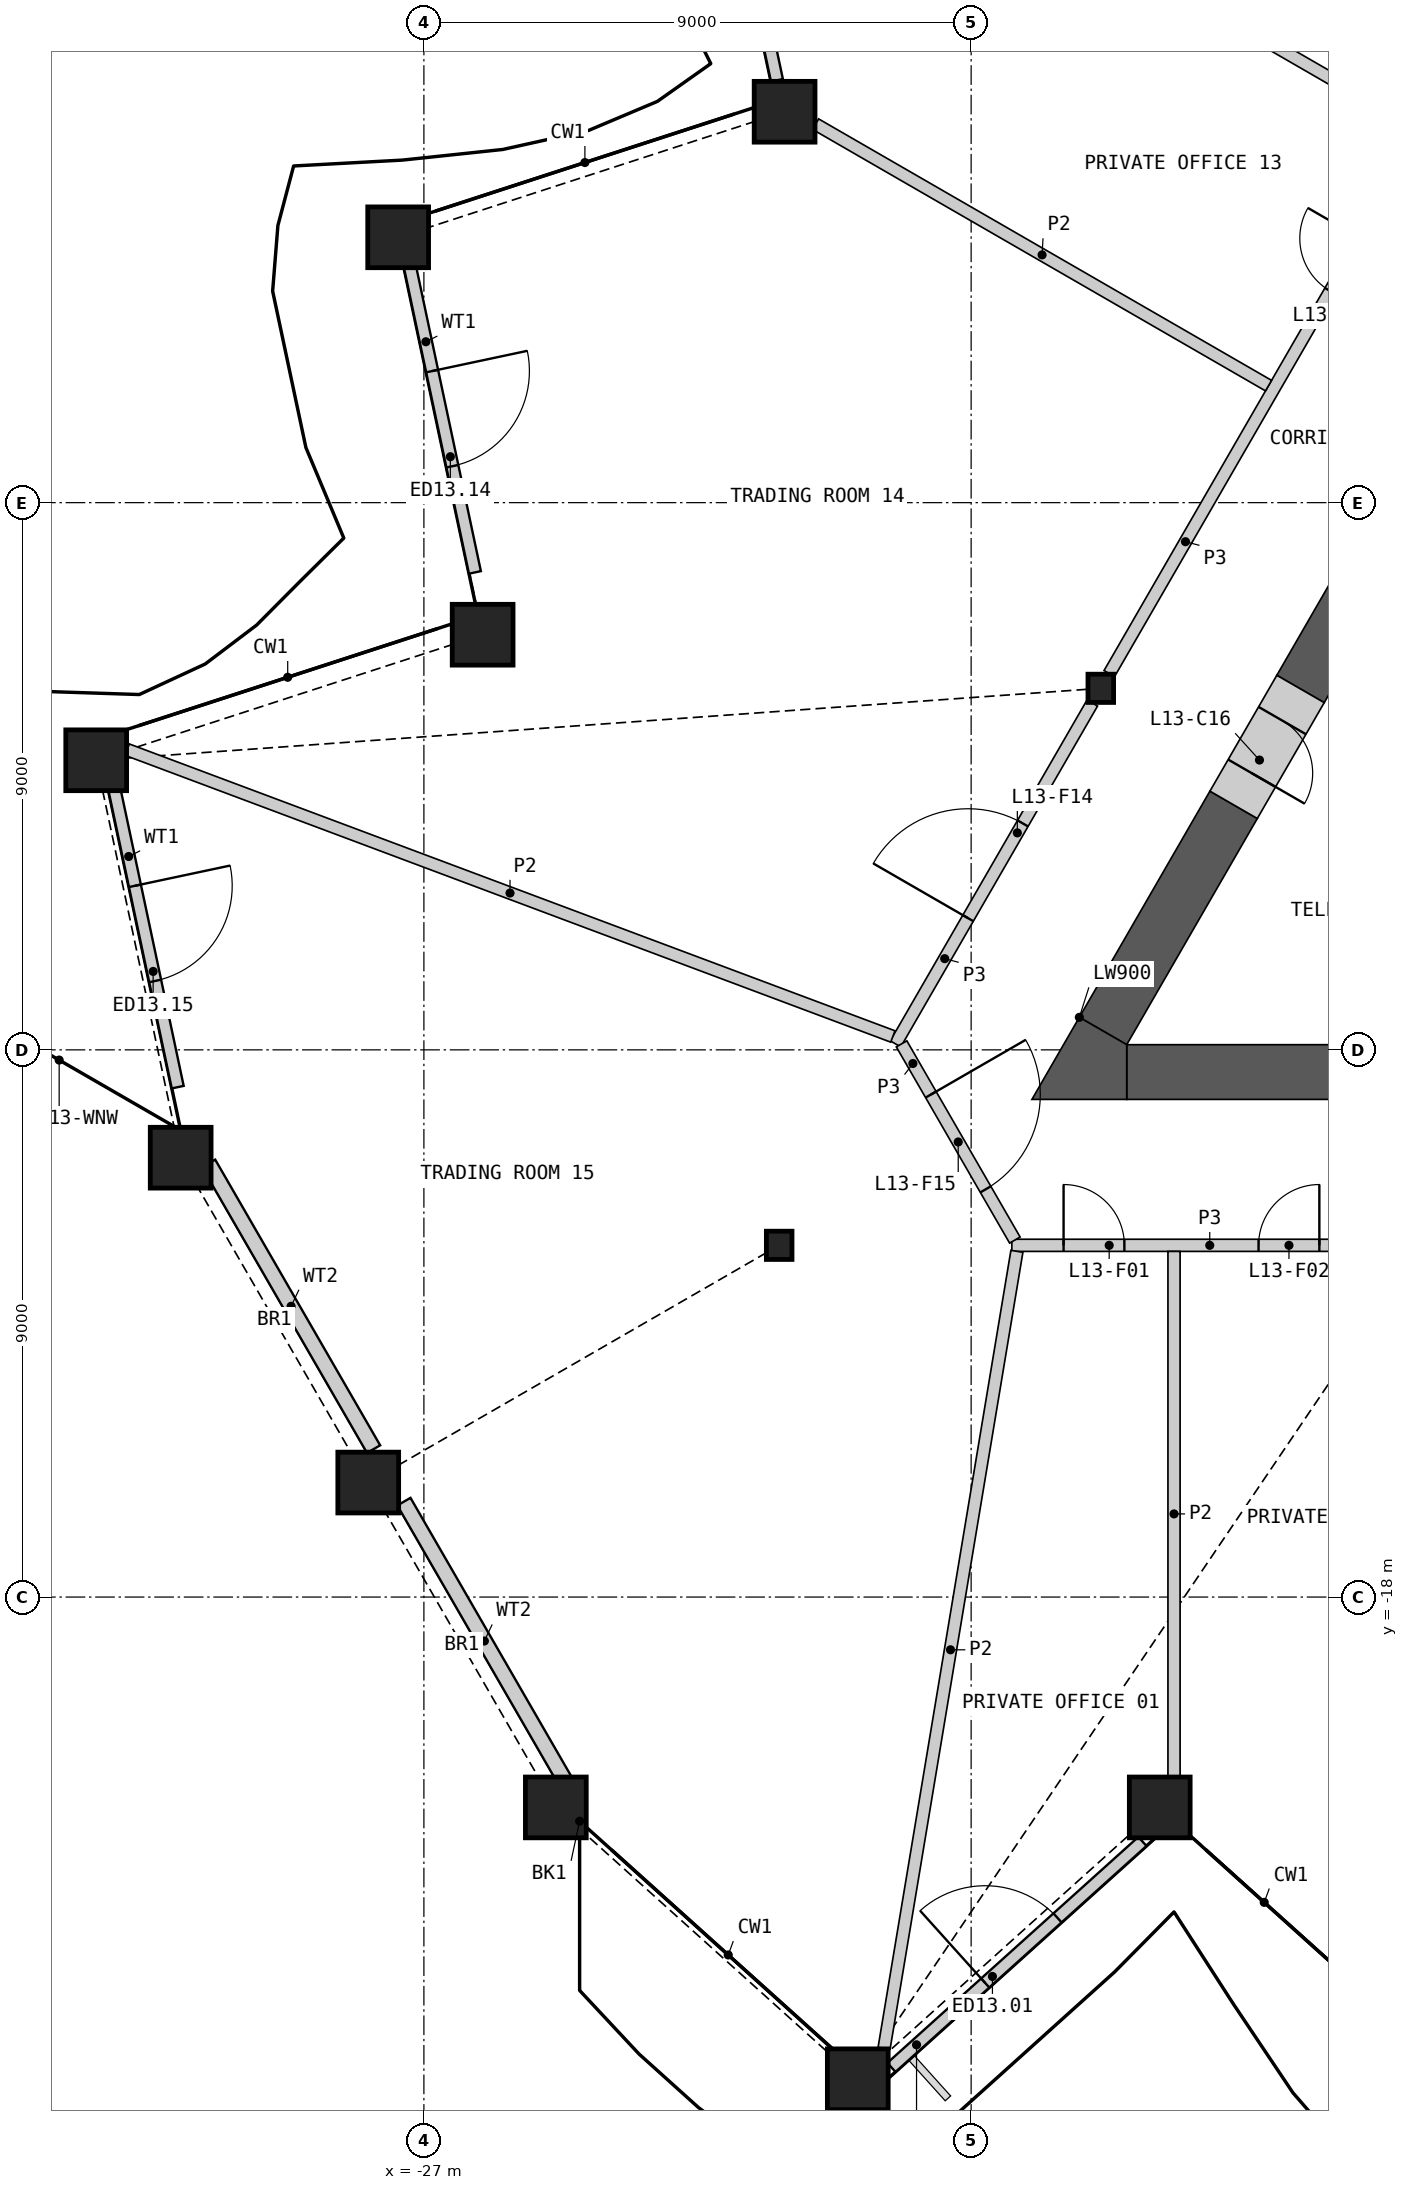
"""IFC4 building model, lengths in metres.
Left out: names, types, materials, properties, quantities, classifications, styles, units other than length and angle.
Written with IfcOpenShell. Run it as: python <this file> out.ifc"""

import sys

from ifc_helpers import new_model, si_unit, direction, frame, frame_2d, origin, origin_2d, place, context, subcontext, project, spatial, polyline, rectangle, hollow_rectangle, i_section, outline, extrude, element, fill, save


model = new_model("IFC4")
c1 = context("Model", 3, precision=1e-05, world=origin(), true_north=direction((0.0, 1.0)))
c2 = subcontext(c1, "Body", "Model", "MODEL_VIEW")
j1 = project(units=[si_unit("LENGTHUNIT", "METRE"), si_unit("PLANEANGLEUNIT", "RADIAN")], contexts=[c1])
p1 = place(None, origin())
s1 = spatial("IfcSite", under=j1, at=p1, CompositionType="ELEMENT")
p2 = place(p1, origin())
s2 = spatial("IfcBuilding", under=s1, at=p2, CompositionType="ELEMENT")
p3 = place(p2, frame((0.0, 0.0, 63.6)))
s3 = spatial("IfcBuildingStorey", under=s2, at=p3, CompositionType="ELEMENT", Elevation=63.6)
for number, where, z_axis, x_axis in (
    (1, (-24.83, -21.46, 0.0), (0.0, 0.0, 1.0), (1.0, 0.0, 0.0)),
    (2, (-19.864, -25.931, 0.0), (0.0, 0.0, 1.0), (1.0, 0.0, 0.0)),
    (3, (-14.898, -21.46, 0.0), (0.0, 0.0, 1.0), (1.0, 0.0, 0.0)),
    (4, (-21.068, 6.429, 0.0), (0.0, 0.0, 1.0), (1.0, 0.0, 0.0)),
    (5, (-27.423, 4.364, 0.0), (0.0, 0.0, 1.0), (1.0, 0.0, 0.0)),
    (6, (-26.034, -2.172, 0.0), (0.0, 0.0, 1.0), (1.0, 0.0, 0.0)),
    (7, (-32.389, -4.237, 0.0), (0.0, 0.0, 1.0), (1.0, 0.0, 0.0)),
    (8, (-31.0, -10.774, 0.0), (0.0, 0.0, 1.0), (1.0, 0.0, 0.0)),
    (9, (-27.915, -16.117, 0.0), (0.0, 0.0, 1.0), (1.0, 0.0, 0.0)),
):
    element("IfcColumn", number, at=place(p3, frame(where, z_axis=z_axis, x_axis=x_axis)), inside=s3, PredefinedType="COLUMN", context=c2, shape_type="SweptSolid", body=[
        extrude(hollow_rectangle(XDim=1.0, YDim=1.0, WallThickness=0.07, at=origin_2d()), origin(), (0.0, 0.0, 1.0), 4.2),
    ])
for number, where, z_axis, x_axis in (
    (10, (-15.868, -3.054, 0.0), (0.0, 0.0, 1.0), (1.0, 0.0, 0.0)),
    (11, (-21.157, -12.215, 0.0), (0.0, 0.0, 1.0), (1.0, 0.0, 0.0)),
):
    element("IfcColumn", number, at=place(p3, frame(where, z_axis=z_axis, x_axis=x_axis)), inside=s3, PredefinedType="COLUMN", context=c2, shape_type="SweptSolid", body=[
        extrude(i_section(OverallWidth=0.421, OverallDepth=0.465, WebThickness=0.045, FlangeThickness=0.072, at=origin_2d()), origin(), (0.0, 0.0, 1.0), 4.2),
    ])
p4 = place(p3, frame((-19.311, -25.736, 0.0), z_axis=(0.0, 0.0, 1.0), x_axis=(0.743147692621, 0.66912742206, 0.0)))
e12 = element("IfcWall", 12, at=p4, inside=s3, PredefinedType="SOLIDWALL", context=c2, shape_type="SweptSolid", body=[
    extrude(rectangle(XDim=5.554, YDim=0.2, at=frame_2d((2.777, 0.0))), origin(), (0.0, 0.0, 1.0), 3.189),
])
p5 = place(p4, frame((2.075, 0.0, 0.0)))
e13 = element("IfcOpeningElement", 13, at=p5, cuts=e12, PredefinedType="OPENING", context=c2, shape_type="SweptSolid", body=[
    extrude(rectangle(XDim=1.6, YDim=2.4, at=frame_2d((0.8, 1.2))), frame((0.0, 0.11, 0.0), z_axis=(0.0, -1.0, 0.0), x_axis=(1.0, 0.0, 0.0)), (0.0, 0.0, 1.0), 0.22),
])
p6 = place(p3, frame((-22.363, 12.449, 0.0), z_axis=(0.0, 0.0, 1.0), x_axis=(0.207901831982, -0.978149696242, 0.0)))
e14 = element("IfcWall", 14, at=p6, inside=s3, PredefinedType="SOLIDWALL", context=c2, shape_type="SweptSolid", body=[
    extrude(rectangle(XDim=5.626, YDim=0.2, at=frame_2d((2.813, 0.0))), origin(), (0.0, 0.0, 1.0), 3.189),
])
p7 = place(p6, frame((1.86, 0.0, 0.0)))
e15 = element("IfcOpeningElement", 15, at=p7, cuts=e14, PredefinedType="OPENING", context=c2, shape_type="SweptSolid", body=[
    extrude(rectangle(XDim=1.6, YDim=2.4, at=frame_2d((0.8, 1.2))), frame((0.0, 0.11, 0.0), z_axis=(0.0, -1.0, 0.0), x_axis=(1.0, 0.0, 0.0)), (0.0, 0.0, 1.0), 0.22),
])
p8 = place(p3, frame((-27.236, 3.911, 0.0), z_axis=(0.0, 0.0, 1.0), x_axis=(0.207877954287, -0.978154771047, 0.0)))
e16 = element("IfcWall", 16, at=p8, inside=s3, PredefinedType="SOLIDWALL", context=c2, shape_type="SweptSolid", body=[
    extrude(rectangle(XDim=5.171, YDim=0.2, at=frame_2d((2.585, 0.0))), origin(), (0.0, 0.0, 1.0), 3.189),
])
p9 = place(p8, frame((1.786, 0.0, 0.0)))
e17 = element("IfcOpeningElement", 17, at=p9, cuts=e16, PredefinedType="OPENING", context=c2, shape_type="SweptSolid", body=[
    extrude(rectangle(XDim=1.6, YDim=2.4, at=frame_2d((0.8, 1.2))), frame((0.0, 0.11, 0.0), z_axis=(0.0, -1.0, 0.0), x_axis=(1.0, 0.0, 0.0)), (0.0, 0.0, 1.0), 0.22),
])
p10 = place(p3, frame((-32.124, -4.555, 0.0), z_axis=(0.0, 0.0, 1.0), x_axis=(0.207923126203, -0.978145169998, 0.0)))
e18 = element("IfcWall", 18, at=p10, inside=s3, PredefinedType="SOLIDWALL", context=c2, shape_type="SweptSolid", body=[
    extrude(rectangle(XDim=5.171, YDim=0.2, at=frame_2d((2.585, 0.0))), origin(), (0.0, 0.0, 1.0), 3.189),
])
p11 = place(p10, frame((1.786, 0.0, 0.0)))
e19 = element("IfcOpeningElement", 19, at=p11, cuts=e18, PredefinedType="OPENING", context=c2, shape_type="SweptSolid", body=[
    extrude(rectangle(XDim=1.6, YDim=2.4, at=frame_2d((0.8, 1.2))), frame((0.0, 0.11, 0.0), z_axis=(0.0, -1.0, 0.0), x_axis=(1.0, 0.0, 0.0)), (0.0, 0.0, 1.0), 0.22),
])
p12 = place(p3, frame((-30.54, -10.868, 0.0), z_axis=(0.0, 0.0, 1.0), x_axis=(0.499991204533, -0.86603048179, 0.0)))
e20 = element("IfcWall", 20, at=p12, inside=s3, PredefinedType="SOLIDWALL", context=c2, shape_type="SweptSolid", body=[
    extrude(rectangle(XDim=5.426, YDim=0.25, at=frame_2d((2.713, 0.0))), origin(), (0.0, 0.0, 1.0), 3.189),
])
p13 = place(p3, frame((-27.329, -16.431, 0.0), z_axis=(0.0, 0.0, 1.0), x_axis=(0.500008603535, -0.866020436474, 0.0)))
e21 = element("IfcWall", 21, at=p13, inside=s3, PredefinedType="SOLIDWALL", context=c2, shape_type="SweptSolid", body=[
    extrude(rectangle(XDim=5.293, YDim=0.25, at=frame_2d((2.646, 0.0))), origin(), (0.0, 0.0, 1.0), 3.189),
])
p14 = place(p3, frame((-15.441, -9.365, 0.0), z_axis=(0.0, 0.0, 1.0), x_axis=(1.0, 0.0, 0.0)))
e22 = element("IfcWall", 22, at=p14, inside=s3, PredefinedType="SHEAR", context=c2, shape_type="SweptSolid", body=[
    extrude(rectangle(XDim=14.341, YDim=0.9, at=frame_2d((7.17, 0.0))), origin(), (0.0, 0.0, 1.0), 3.8),
])
p15 = place(p3, frame((-10.31, 0.872, 0.0), z_axis=(0.0, 0.0, 1.0), x_axis=(-0.499968858743, -0.866043382451, 0.0)))
e23 = element("IfcWall", 23, at=p15, inside=s3, PredefinedType="SHEAR", context=c2, shape_type="SweptSolid", body=[
    extrude(rectangle(XDim=4.546, YDim=0.9, at=frame_2d((2.273, 0.0))), origin(), (0.0, 0.0, 1.0), 3.8),
])
p16 = place(p3, frame((-13.683, -4.97, 0.0), z_axis=(0.0, 0.0, 1.0), x_axis=(-0.499996331799, -0.866027521611, 0.0)))
e24 = element("IfcWall", 24, at=p16, inside=s3, PredefinedType="SHEAR", context=c2, shape_type="SweptSolid", body=[
    extrude(rectangle(XDim=4.295, YDim=0.9, at=frame_2d((2.148, 0.0))), origin(), (0.0, 0.0, 1.0), 3.8),
])
p17 = place(p3, origin())
e25 = element("IfcWall", 25, at=p17, inside=s3, PredefinedType="SHEAR", context=c2, shape_type="SweptSolid", body=[
    extrude(outline(polyline([(-16.221, -8.465), (-15.441, -8.915), (-15.441, -9.815), (-17.0, -9.815), (-16.221, -8.465)])), origin(), (0.0, 0.0, 1.0), 3.8),
])
p18 = place(p3, frame((-12.583, -3.065, 0.0), z_axis=(0.0, 0.0, 1.0), x_axis=(-0.50002983664, -0.866008176907, 0.0)))
e26 = element("IfcWall", 26, at=p18, inside=s3, PredefinedType="SHEAR", context=c2, shape_type="SweptSolid", body=[
    extrude(rectangle(XDim=2.2, YDim=0.9, at=frame_2d((1.1, 0.0))), origin(), (0.0, 0.0, 1.0), 3.8),
])
p19 = place(p18, frame((0.6, 0.0, 0.0)))
e27 = element("IfcOpeningElement", 27, at=p19, cuts=e26, PredefinedType="OPENING", context=c2, shape_type="SweptSolid", body=[
    extrude(rectangle(XDim=1.0, YDim=2.1, at=frame_2d((0.5, 1.05))), frame((0.0, 0.46, 0.0), z_axis=(0.0, -1.0, 0.0), x_axis=(1.0, 0.0, 0.0)), (0.0, 0.0, 1.0), 0.92),
])
p20 = place(p3, frame((-15.728, -2.811, 0.0), z_axis=(0.0, 0.0, 1.0), x_axis=(0.49999175339, 0.866030164915, 0.0)))
e28 = element("IfcWall", 28, at=p20, inside=s3, PredefinedType="PARTITIONING", context=c2, shape_type="SweptSolid", body=[
    extrude(rectangle(XDim=10.019, YDim=0.2, at=frame_2d((5.009, 0.0))), origin(), (0.0, 0.0, 1.0), 3.8),
])
p21 = place(p20, frame((7.266, 0.0, 0.0)))
e29 = element("IfcOpeningElement", 29, at=p21, cuts=e28, PredefinedType="OPENING", context=c2, shape_type="SweptSolid", body=[
    extrude(rectangle(XDim=1.0, YDim=2.1, at=frame_2d((0.5, 1.05))), frame((0.0, 0.11, 0.0), z_axis=(0.0, -1.0, 0.0), x_axis=(1.0, 0.0, 0.0)), (0.0, 0.0, 1.0), 0.22),
])
p22 = place(p3, frame((-17.331, -12.215, 0.0), z_axis=(0.0, 0.0, 1.0), x_axis=(1.0, 0.0, 0.0)))
e30 = element("IfcWall", 30, at=p22, inside=s3, PredefinedType="PARTITIONING", context=c2, shape_type="SweptSolid", body=[
    extrude(rectangle(XDim=6.51, YDim=0.2, at=frame_2d((3.255, 0.0))), origin(), (0.0, 0.0, 1.0), 3.8),
])
p23 = place(p22, frame((0.851, 0.0, 0.0)))
e31 = element("IfcOpeningElement", 31, at=p23, cuts=e30, PredefinedType="OPENING", context=c2, shape_type="SweptSolid", body=[
    extrude(rectangle(XDim=1.0, YDim=2.1, at=frame_2d((0.5, 1.05))), frame((0.0, 0.11, 0.0), z_axis=(0.0, -1.0, 0.0), x_axis=(1.0, 0.0, 0.0)), (0.0, 0.0, 1.0), 0.22),
])
p24 = place(p22, frame((4.058, 0.0, 0.0)))
e32 = element("IfcOpeningElement", 32, at=p24, cuts=e30, PredefinedType="OPENING", context=c2, shape_type="SweptSolid", body=[
    extrude(rectangle(XDim=1.0, YDim=2.1, at=frame_2d((0.5, 1.05))), frame((0.0, 0.11, 0.0), z_axis=(0.0, -1.0, 0.0), x_axis=(1.0, 0.0, 0.0)), (0.0, 0.0, 1.0), 0.22),
])
p25 = place(p3, frame((-19.244, -8.902, 0.0), z_axis=(0.0, 0.0, 1.0), x_axis=(0.499984737558, 0.86603421538, 0.0)))
e33 = element("IfcWall", 33, at=p25, inside=s3, PredefinedType="PARTITIONING", context=c2, shape_type="SweptSolid", body=[
    extrude(rectangle(XDim=6.473, YDim=0.2, at=frame_2d((3.236, 0.0))), origin(), (0.0, 0.0, 1.0), 3.8),
])
p26 = place(p25, frame((2.387, 0.0, 0.0)))
e34 = element("IfcOpeningElement", 34, at=p26, cuts=e33, PredefinedType="OPENING", context=c2, shape_type="SweptSolid", body=[
    extrude(rectangle(XDim=1.8, YDim=2.1, at=frame_2d((0.9, 1.05))), frame((0.0, 0.11, 0.0), z_axis=(0.0, -1.0, 0.0), x_axis=(1.0, 0.0, 0.0)), (0.0, 0.0, 1.0), 0.22),
])
p27 = place(p3, frame((-19.144, -8.902, 0.0), z_axis=(0.0, 0.0, 1.0), x_axis=(0.499958791762, -0.866049194065, 0.0)))
e35 = element("IfcWall", 35, at=p27, inside=s3, PredefinedType="PARTITIONING", context=c2, shape_type="SweptSolid", body=[
    extrude(rectangle(XDim=3.726, YDim=0.2, at=frame_2d((1.863, 0.0))), origin(), (0.0, 0.0, 1.0), 3.8),
])
p28 = place(p27, frame((0.963, 0.0, 0.0)))
e36 = element("IfcOpeningElement", 36, at=p28, cuts=e35, PredefinedType="OPENING", context=c2, shape_type="SweptSolid", body=[
    extrude(rectangle(XDim=1.8, YDim=2.1, at=frame_2d((0.9, 1.05))), frame((0.0, 0.11, 0.0), z_axis=(0.0, -1.0, 0.0), x_axis=(1.0, 0.0, 0.0)), (0.0, 0.0, 1.0), 0.22),
])
p29 = place(p3, frame((-31.879, -4.062, 0.0), z_axis=(0.0, 0.0, 1.0), x_axis=(0.93644254502, -0.350820979814, 0.0)))
e37 = element("IfcWall", 37, at=p29, inside=s3, PredefinedType="PARTITIONING", context=c2, shape_type="SweptSolid", body=[
    extrude(rectangle(XDim=13.447, YDim=0.2, at=frame_2d((6.723, 0.0))), origin(), (0.0, 0.0, 1.0), 2.885),
])
p30 = place(p3, frame((-19.432, -25.421, 0.0), z_axis=(0.0, 0.0, 1.0), x_axis=(0.164396008001, 0.986394420378, 0.0)))
e38 = element("IfcWall", 38, at=p30, inside=s3, PredefinedType="PARTITIONING", context=c2, shape_type="SweptSolid", body=[
    extrude(rectangle(XDim=13.289, YDim=0.2, at=frame_2d((6.644, 0.0))), origin(), (0.0, 0.0, 1.0), 2.885),
])
p31 = place(p3, frame((-21.947, 12.671, 0.0), z_axis=(0.0, 0.0, 1.0), x_axis=(0.866026729935, -0.499997703033, 0.0)))
e39 = element("IfcWall", 39, at=p31, inside=s3, PredefinedType="PARTITIONING", context=c2, shape_type="SweptSolid", body=[
    extrude(rectangle(XDim=12.848, YDim=0.2, at=frame_2d((6.424, 0.0))), origin(), (0.0, 0.0, 1.0), 2.885),
])
p32 = place(p3, frame((-14.663, -20.95, 0.0), z_axis=(0.0, 0.0, 1.0), x_axis=(0.0, 1.0, 0.0)))
e40 = element("IfcWall", 40, at=p32, inside=s3, PredefinedType="PARTITIONING", context=c2, shape_type="SweptSolid", body=[
    extrude(rectangle(XDim=8.635, YDim=0.2, at=frame_2d((4.317, 0.0))), origin(), (0.0, 0.0, 1.0), 2.885),
])
p33 = place(p3, frame((-20.558, 6.225, 0.0), z_axis=(0.0, 0.0, 1.0), x_axis=(0.866031967744, -0.499988630717, 0.0)))
e41 = element("IfcWall", 41, at=p33, inside=s3, PredefinedType="PARTITIONING", context=c2, shape_type="SweptSolid", body=[
    extrude(rectangle(XDim=8.601, YDim=0.2, at=frame_2d((4.301, 0.0))), origin(), (0.0, 0.0, 1.0), 2.885),
])
p34 = place(p5, origin())
e42 = element("IfcDoor", 42, at=p34, inside=s3, OperationType="DOUBLE_DOOR_SINGLE_SWING", PredefinedType="DOOR", context=c2, shape_type="SweptSolid", body=[
    extrude(rectangle(XDim=1.6, YDim=2.4, at=frame_2d((0.8, 1.2))), frame((0.0, 0.025, 0.0), z_axis=(0.0, -1.0, 0.0), x_axis=(1.0, 0.0, 0.0)), (0.0, 0.0, 1.0), 0.05),
])
fill(e13, e42)
p35 = place(p9, origin())
e43 = element("IfcDoor", 43, at=p35, inside=s3, OperationType="DOUBLE_DOOR_SINGLE_SWING", PredefinedType="DOOR", context=c2, shape_type="SweptSolid", body=[
    extrude(rectangle(XDim=1.6, YDim=2.4, at=frame_2d((0.8, 1.2))), frame((0.0, 0.025, 0.0), z_axis=(0.0, -1.0, 0.0), x_axis=(1.0, 0.0, 0.0)), (0.0, 0.0, 1.0), 0.05),
])
fill(e17, e43)
p36 = place(p11, origin())
e44 = element("IfcDoor", 44, at=p36, inside=s3, OperationType="DOUBLE_DOOR_SINGLE_SWING", PredefinedType="DOOR", context=c2, shape_type="SweptSolid", body=[
    extrude(rectangle(XDim=1.6, YDim=2.4, at=frame_2d((0.8, 1.2))), frame((0.0, 0.025, 0.0), z_axis=(0.0, -1.0, 0.0), x_axis=(1.0, 0.0, 0.0)), (0.0, 0.0, 1.0), 0.05),
])
fill(e19, e44)
p37 = place(p19, origin())
e45 = element("IfcDoor", 45, at=p37, inside=s3, OperationType="SINGLE_SWING_RIGHT", PredefinedType="DOOR", context=c2, shape_type="SweptSolid", body=[
    extrude(rectangle(XDim=1.0, YDim=2.1, at=frame_2d((0.5, 1.05))), frame((0.0, 0.205, 0.0), z_axis=(0.0, -1.0, 0.0), x_axis=(1.0, 0.0, 0.0)), (0.0, 0.0, 1.0), 0.05),
])
fill(e27, e45)
p38 = place(p23, origin())
e46 = element("IfcDoor", 46, at=p38, inside=s3, OperationType="SINGLE_SWING_LEFT", PredefinedType="DOOR", context=c2, shape_type="SweptSolid", body=[
    extrude(rectangle(XDim=1.0, YDim=2.1, at=frame_2d((0.5, 1.05))), frame((0.0, 0.025, 0.0), z_axis=(0.0, -1.0, 0.0), x_axis=(1.0, 0.0, 0.0)), (0.0, 0.0, 1.0), 0.05),
])
fill(e31, e46)
p39 = place(p24, origin())
e47 = element("IfcDoor", 47, at=p39, inside=s3, OperationType="SINGLE_SWING_RIGHT", PredefinedType="DOOR", context=c2, shape_type="SweptSolid", body=[
    extrude(rectangle(XDim=1.0, YDim=2.1, at=frame_2d((0.5, 1.05))), frame((0.0, 0.025, 0.0), z_axis=(0.0, -1.0, 0.0), x_axis=(1.0, 0.0, 0.0)), (0.0, 0.0, 1.0), 0.05),
])
fill(e32, e47)
p40 = place(p26, origin())
e48 = element("IfcDoor", 48, at=p40, inside=s3, OperationType="DOUBLE_DOOR_SINGLE_SWING", PredefinedType="DOOR", context=c2, shape_type="SweptSolid", body=[
    extrude(rectangle(XDim=1.8, YDim=2.1, at=frame_2d((0.9, 1.05))), frame((0.0, 0.025, 0.0), z_axis=(0.0, -1.0, 0.0), x_axis=(1.0, 0.0, 0.0)), (0.0, 0.0, 1.0), 0.05),
])
fill(e34, e48)
p41 = place(p28, origin())
e49 = element("IfcDoor", 49, at=p41, inside=s3, OperationType="DOUBLE_DOOR_SINGLE_SWING", PredefinedType="DOOR", context=c2, shape_type="SweptSolid", body=[
    extrude(rectangle(XDim=1.8, YDim=2.1, at=frame_2d((0.9, 1.05))), frame((0.0, 0.025, 0.0), z_axis=(0.0, -1.0, 0.0), x_axis=(1.0, 0.0, 0.0)), (0.0, 0.0, 1.0), 0.05),
])
fill(e36, e49)
save(model, sys.argv[1])
